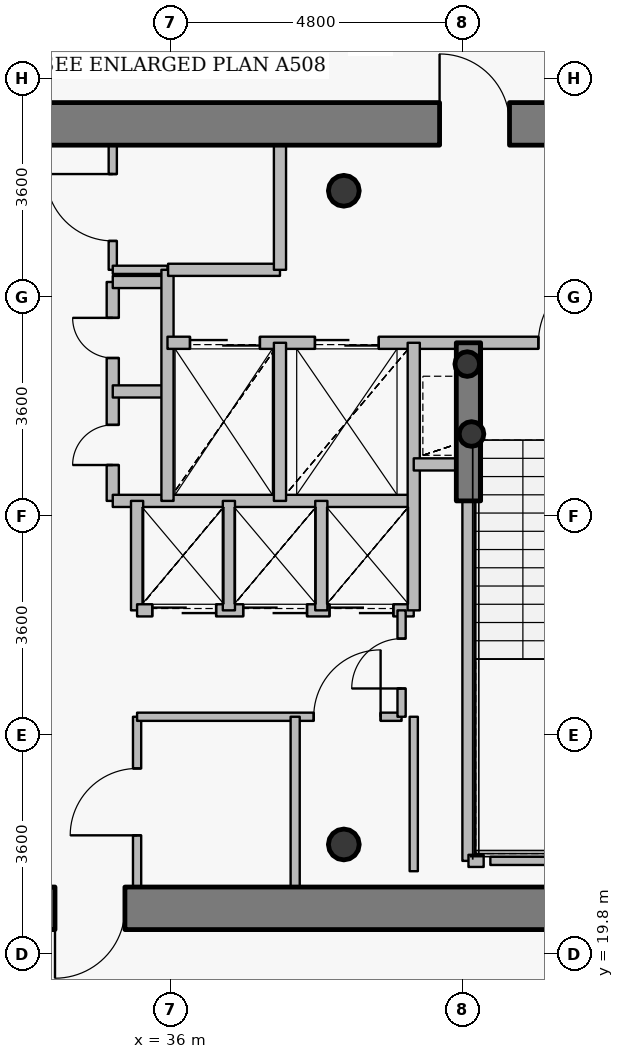
"""IFC4 building model, lengths in metres.
Left out: names, types, materials, properties, quantities, classifications, styles, units other than length and angle.
Written with IfcOpenShell. Run it as: python <this file> out.ifc"""

import sys

from ifc_helpers import new_model, si_unit, direction, frame, frame_2d, origin, origin_2d, place, context, subcontext, project, spatial, rectangle, hollow_circle, extrude, source, transform, mapped, element, fill, save


model = new_model("IFC4")
c1 = context("Model", 3, precision=1e-05, world=origin(), true_north=direction((0.0, 1.0)))
c2 = subcontext(c1, "Body", "Model", "MODEL_VIEW")
j1 = project(units=[si_unit("LENGTHUNIT", "METRE"), si_unit("PLANEANGLEUNIT", "RADIAN")], contexts=[c1])
p1 = place(None, origin())
s1 = spatial("IfcSite", under=j1, at=p1, CompositionType="ELEMENT")
p2 = place(p1, origin())
s2 = spatial("IfcBuilding", under=s1, at=p2, CompositionType="ELEMENT")
p3 = place(p2, frame((0.0, 0.0, 295.5)))
s3 = spatial("IfcBuildingStorey", under=s2, at=p3, CompositionType="ELEMENT", Elevation=295.5)
for number, where, z_axis, x_axis in (
    (1, (38.85, 21.6, 0.0), (0.0, 0.0, 1.0), (1.0, 0.0, 0.0)),
    (2, (38.85, 32.35, 0.0), (0.0, 0.0, 1.0), (1.0, 0.0, 0.0)),
):
    element("IfcColumn", number, at=place(p3, frame(where, z_axis=z_axis, x_axis=x_axis)), inside=s3, PredefinedType="COLUMN", context=c2, shape_type="SweptSolid", body=[
        extrude(hollow_circle(Radius=0.254, WallThickness=0.02, at=origin_2d()), origin(), (0.0, 0.0, 1.0), 3.75),
    ])
for number, where, z_axis, x_axis in (
    (3, (40.95, 28.35, 0.0), (0.0, 0.0, 1.0), (1.0, 0.0, 0.0)),
    (4, (40.88, 29.5, 0.0), (0.0, 0.0, 1.0), (1.0, 0.0, 0.0)),
):
    element("IfcColumn", number, at=place(p3, frame(where, z_axis=z_axis, x_axis=x_axis)), inside=s3, PredefinedType="COLUMN", context=c2, shape_type="SweptSolid", body=[
        extrude(hollow_circle(Radius=0.203, WallThickness=0.016, at=origin_2d()), origin(), (0.0, 0.0, 1.0), 3.75),
    ])
p4 = place(p3, frame((27.65, 33.45, 0.0), z_axis=(0.0, 0.0, 1.0), x_axis=(1.0, 0.0, 0.0)))
e5 = element("IfcWall", 5, at=p4, inside=s3, PredefinedType="SHEAR", context=c2, shape_type="SweptSolid", body=[
    extrude(rectangle(XDim=16.7, YDim=0.7, at=frame_2d((8.35, 0.0))), origin(), (0.0, 0.0, 1.0), 3.05),
])
p5 = place(p4, frame((12.775, 0.0, 0.0)))
e6 = element("IfcOpeningElement", 6, at=p5, cuts=e5, PredefinedType="OPENING", context=c2, shape_type="SweptSolid", body=[
    extrude(rectangle(XDim=1.15, YDim=2.15, at=origin_2d()), frame((0.575, 0.36, 1.075), z_axis=(0.0, -1.0, 0.0), x_axis=(1.0, 0.0, 0.0)), (0.0, 0.0, 1.0), 0.72),
])
p6 = place(p3, frame((44.35, 20.55, 0.0), z_axis=(0.0, 0.0, 1.0), x_axis=(-1.0, 0.0, 0.0)))
e7 = element("IfcWall", 7, at=p6, inside=s3, PredefinedType="SHEAR", context=c2, shape_type="SweptSolid", body=[
    extrude(rectangle(XDim=16.7, YDim=0.7, at=frame_2d((8.35, 0.0))), origin(), (0.0, 0.0, 1.0), 3.05),
])
p7 = place(p6, frame((12.925, 0.0, 0.0)))
e8 = element("IfcOpeningElement", 8, at=p7, cuts=e7, PredefinedType="OPENING", context=c2, shape_type="SweptSolid", body=[
    extrude(rectangle(XDim=1.15, YDim=2.15, at=origin_2d()), frame((0.575, 0.36, 1.075), z_axis=(0.0, -1.0, 0.0), x_axis=(1.0, 0.0, 0.0)), (0.0, 0.0, 1.0), 0.72),
])
p8 = place(p6, frame((9.1, 0.0, 0.0)))
e9 = element("IfcOpeningElement", 9, at=p8, cuts=e7, PredefinedType="OPENING", context=c2, shape_type="SweptSolid", body=[
    extrude(rectangle(XDim=1.15, YDim=2.15, at=origin_2d()), frame((0.575, 0.36, 1.075), z_axis=(0.0, -1.0, 0.0), x_axis=(1.0, 0.0, 0.0)), (0.0, 0.0, 1.0), 0.72),
])
p9 = place(p3, frame((40.9, 27.25, 0.0), z_axis=(0.0, 0.0, 1.0), x_axis=(0.0, 1.0, 0.0)))
e10 = element("IfcWall", 10, at=p9, inside=s3, PredefinedType="SHEAR", context=c2, shape_type="SweptSolid", body=[
    extrude(rectangle(XDim=2.6, YDim=0.4, at=frame_2d((1.3, 0.0))), origin(), (0.0, 0.0, 1.0), 3.1),
])
p10 = place(p3, frame((35.05, 27.25, 0.0), z_axis=(0.0, 0.0, 1.0), x_axis=(0.0, 1.0, 0.0)))
e11 = element("IfcWall", 11, at=p10, inside=s3, PredefinedType="PARTITIONING", context=c2, shape_type="SweptSolid", body=[
    extrude(rectangle(XDim=3.6, YDim=0.2, at=frame_2d((1.8, 0.0))), origin(), (0.0, 0.0, 1.0), 3.5),
])
p11 = place(p10, frame((0.59, 0.0, 0.0)))
e12 = element("IfcOpeningElement", 12, at=p11, cuts=e11, PredefinedType="OPENING", context=c2, shape_type="SweptSolid", body=[
    extrude(rectangle(XDim=0.66, YDim=2.05, at=origin_2d()), frame((0.33, 0.11, 1.025), z_axis=(0.0, -1.0, 0.0), x_axis=(1.0, 0.0, 0.0)), (0.0, 0.0, 1.0), 0.22),
])
p12 = place(p10, frame((2.35, 0.0, 0.0)))
e13 = element("IfcOpeningElement", 13, at=p12, cuts=e11, PredefinedType="OPENING", context=c2, shape_type="SweptSolid", body=[
    extrude(rectangle(XDim=0.66, YDim=2.05, at=origin_2d()), frame((0.33, 0.11, 1.025), z_axis=(0.0, -1.0, 0.0), x_axis=(1.0, 0.0, 0.0)), (0.0, 0.0, 1.0), 0.22),
])
p13 = place(p3, frame((35.05, 27.25, 0.0), z_axis=(0.0, 0.0, 1.0), x_axis=(1.0, 0.0, 0.0)))
e14 = element("IfcWall", 14, at=p13, inside=s3, PredefinedType="PARTITIONING", context=c2, shape_type="SweptSolid", body=[
    extrude(rectangle(XDim=4.95, YDim=0.2, at=frame_2d((2.475, 0.0))), origin(), (0.0, 0.0, 1.0), 3.085),
])
for number, where, z_axis, x_axis in (
    (15, (35.05, 29.05, 0.0), (0.0, 0.0, 1.0), (1.0, 0.0, 0.0)),
    (16, (35.05, 30.85, 0.0), (0.0, 0.0, 1.0), (1.0, 0.0, 0.0)),
):
    element("IfcWall", number, at=place(p3, frame(where, z_axis=z_axis, x_axis=x_axis)), inside=s3, PredefinedType="PARTITIONING", context=c2, shape_type="SweptSolid", body=[
        extrude(rectangle(XDim=0.9, YDim=0.2, at=frame_2d((0.45, 0.0))), origin(), (0.0, 0.0, 1.0), 3.5),
    ])
p14 = place(p3, frame((35.05, 31.05, 0.0), z_axis=(0.0, 0.0, 1.0), x_axis=(0.0, 1.0, 0.0)))
e17 = element("IfcWall", 17, at=p14, inside=s3, PredefinedType="PARTITIONING", context=c2, shape_type="SweptSolid", body=[
    extrude(rectangle(XDim=2.05, YDim=0.135, at=frame_2d((1.025, 0.0))), origin(), (0.0, 0.0, 1.0), 3.085),
])
p15 = place(p14, frame((0.475, 0.0, 0.0)))
e18 = element("IfcOpeningElement", 18, at=p15, cuts=e17, PredefinedType="OPENING", context=c2, shape_type="SweptSolid", body=[
    extrude(rectangle(XDim=1.1, YDim=2.15, at=origin_2d()), frame((0.55, 0.078, 1.075), z_axis=(0.0, -1.0, 0.0), x_axis=(1.0, 0.0, 0.0)), (0.0, 0.0, 1.0), 0.155),
])
p16 = place(p3, frame((35.05, 31.05, 0.0), z_axis=(0.0, 0.0, 1.0), x_axis=(1.0, 0.0, 0.0)))
e19 = element("IfcWall", 19, at=p16, inside=s3, PredefinedType="PARTITIONING", context=c2, shape_type="SweptSolid", body=[
    extrude(rectangle(XDim=0.9, YDim=0.135, at=frame_2d((0.45, 0.0))), origin(), (0.0, 0.0, 1.0), 3.5),
])
p17 = place(p3, frame((35.45, 20.9, 0.0), z_axis=(0.0, 0.0, 1.0), x_axis=(0.0, 1.0, 0.0)))
e20 = element("IfcWall", 20, at=p17, inside=s3, PredefinedType="PARTITIONING", context=c2, shape_type="SweptSolid", body=[
    extrude(rectangle(XDim=2.8, YDim=0.135, at=frame_2d((1.4, 0.0))), origin(), (0.0, 0.0, 1.0), 3.085),
])
p18 = place(p17, frame((0.85, 0.0, 0.0)))
e21 = element("IfcOpeningElement", 21, at=p18, cuts=e20, PredefinedType="OPENING", context=c2, shape_type="SweptSolid", body=[
    extrude(rectangle(XDim=1.1, YDim=2.15, at=origin_2d()), frame((0.55, 0.078, 1.075), z_axis=(0.0, -1.0, 0.0), x_axis=(1.0, 0.0, 0.0)), (0.0, 0.0, 1.0), 0.155),
])
p19 = place(p3, frame((35.45, 23.7, 0.0), z_axis=(0.0, 0.0, 1.0), x_axis=(1.0, 0.0, 0.0)))
e22 = element("IfcWall", 22, at=p19, inside=s3, PredefinedType="PARTITIONING", context=c2, shape_type="SweptSolid", body=[
    extrude(rectangle(XDim=4.35, YDim=0.135, at=frame_2d((2.175, 0.0))), origin(), (0.0, 0.0, 1.0), 3.085),
])
p20 = place(p19, frame((2.905, 0.0, 0.0)))
e23 = element("IfcOpeningElement", 23, at=p20, cuts=e22, PredefinedType="OPENING", context=c2, shape_type="SweptSolid", body=[
    extrude(rectangle(XDim=1.1, YDim=2.15, at=origin_2d()), frame((0.55, 0.078, 1.075), z_axis=(0.0, -1.0, 0.0), x_axis=(1.0, 0.0, 0.0)), (0.0, 0.0, 1.0), 0.155),
])
p21 = place(p3, frame((35.45, 25.45, 0.0), z_axis=(0.0, 0.0, 1.0), x_axis=(0.0, 1.0, 0.0)))
e24 = element("IfcWall", 24, at=p21, inside=s3, PredefinedType="PARTITIONING", context=c2, shape_type="SweptSolid", body=[
    extrude(rectangle(XDim=1.8, YDim=0.2, at=frame_2d((0.9, 0.0))), origin(), (0.0, 0.0, 1.0), 3.5),
])
p22 = place(p3, frame((35.45, 25.45, 0.0), z_axis=(0.0, 0.0, 1.0), x_axis=(1.0, 0.0, 0.0)))
e25 = element("IfcWall", 25, at=p22, inside=s3, PredefinedType="PARTITIONING", context=c2, shape_type="SweptSolid", body=[
    extrude(rectangle(XDim=4.55, YDim=0.2, at=frame_2d((2.275, 0.0))), origin(), (0.0, 0.0, 1.0), 3.085),
])
p23 = place(p22, frame((0.25, 0.0, 0.0)))
e26 = element("IfcOpeningElement", 26, at=p23, cuts=e25, PredefinedType="OPENING", context=c2, shape_type="SweptSolid", body=[
    extrude(rectangle(XDim=1.05, YDim=2.15, at=origin_2d()), frame((0.525, 0.11, 1.075), z_axis=(0.0, -1.0, 0.0), x_axis=(1.0, 0.0, 0.0)), (0.0, 0.0, 1.0), 0.22),
])
p24 = place(p22, frame((1.745, 0.0, 0.0)))
e27 = element("IfcOpeningElement", 27, at=p24, cuts=e25, PredefinedType="OPENING", context=c2, shape_type="SweptSolid", body=[
    extrude(rectangle(XDim=1.05, YDim=2.15, at=origin_2d()), frame((0.525, 0.11, 1.075), z_axis=(0.0, -1.0, 0.0), x_axis=(1.0, 0.0, 0.0)), (0.0, 0.0, 1.0), 0.22),
])
p25 = place(p22, frame((3.165, 0.0, 0.0)))
e28 = element("IfcOpeningElement", 28, at=p25, cuts=e25, PredefinedType="OPENING", context=c2, shape_type="SweptSolid", body=[
    extrude(rectangle(XDim=1.05, YDim=2.15, at=origin_2d()), frame((0.525, 0.11, 1.075), z_axis=(0.0, -1.0, 0.0), x_axis=(1.0, 0.0, 0.0)), (0.0, 0.0, 1.0), 0.22),
])
p26 = place(p3, frame((35.95, 27.25, 0.0), z_axis=(0.0, 0.0, 1.0), x_axis=(0.0, 1.0, 0.0)))
e29 = element("IfcWall", 29, at=p26, inside=s3, PredefinedType="PARTITIONING", context=c2, shape_type="SweptSolid", body=[
    extrude(rectangle(XDim=3.8, YDim=0.2, at=frame_2d((1.9, 0.0))), origin(), (0.0, 0.0, 1.0), 3.5),
])
p27 = place(p3, frame((35.95, 29.85, 0.0), z_axis=(0.0, 0.0, 1.0), x_axis=(1.0, 0.0, 0.0)))
e30 = element("IfcWall", 30, at=p27, inside=s3, PredefinedType="PARTITIONING", context=c2, shape_type="SweptSolid", body=[
    extrude(rectangle(XDim=8.49, YDim=0.2, at=frame_2d((4.245, 0.0))), origin(), (0.0, 0.0, 1.0), 3.085),
])
p28 = place(p27, frame((6.1, 0.0, 0.0)))
e31 = element("IfcOpeningElement", 31, at=p28, cuts=e30, PredefinedType="OPENING", context=c2, shape_type="SweptSolid", body=[
    extrude(rectangle(XDim=1.2, YDim=2.15, at=origin_2d()), frame((0.6, 0.11, 1.075), z_axis=(0.0, -1.0, 0.0), x_axis=(1.0, 0.0, 0.0)), (0.0, 0.0, 1.0), 0.22),
])
p29 = place(p27, frame((0.37, 0.0, 0.0)))
e32 = element("IfcOpeningElement", 32, at=p29, cuts=e30, PredefinedType="OPENING", context=c2, shape_type="SweptSolid", body=[
    extrude(rectangle(XDim=1.15, YDim=2.15, at=origin_2d()), frame((0.575, 0.11, 1.075), z_axis=(0.0, -1.0, 0.0), x_axis=(1.0, 0.0, 0.0)), (0.0, 0.0, 1.0), 0.22),
])
p30 = place(p27, frame((2.425, 0.0, 0.0)))
e33 = element("IfcOpeningElement", 33, at=p30, cuts=e30, PredefinedType="OPENING", context=c2, shape_type="SweptSolid", body=[
    extrude(rectangle(XDim=1.05, YDim=2.15, at=origin_2d()), frame((0.525, 0.11, 1.075), z_axis=(0.0, -1.0, 0.0), x_axis=(1.0, 0.0, 0.0)), (0.0, 0.0, 1.0), 0.22),
])
p31 = place(p3, frame((35.96, 31.05, 0.0), z_axis=(0.0, 0.0, 1.0), x_axis=(1.0, 0.0, 0.0)))
e34 = element("IfcWall", 34, at=p31, inside=s3, PredefinedType="PARTITIONING", context=c2, shape_type="SweptSolid", body=[
    extrude(rectangle(XDim=1.84, YDim=0.2, at=frame_2d((0.92, 0.0))), origin(), (0.0, 0.0, 1.0), 3.5),
])
p32 = place(p3, frame((36.96, 25.45, 0.0), z_axis=(0.0, 0.0, 1.0), x_axis=(0.0, 1.0, 0.0)))
e35 = element("IfcWall", 35, at=p32, inside=s3, PredefinedType="PARTITIONING", context=c2, shape_type="SweptSolid", body=[
    extrude(rectangle(XDim=1.8, YDim=0.2, at=frame_2d((0.9, 0.0))), origin(), (0.0, 0.0, 1.0), 3.5),
])
p33 = place(p3, frame((37.8, 27.25, 0.0), z_axis=(0.0, 0.0, 1.0), x_axis=(0.0, 1.0, 0.0)))
e36 = element("IfcWall", 36, at=p33, inside=s3, PredefinedType="PARTITIONING", context=c2, shape_type="SweptSolid", body=[
    extrude(rectangle(XDim=2.6, YDim=0.2, at=frame_2d((1.3, 0.0))), origin(), (0.0, 0.0, 1.0), 3.5),
])
p34 = place(p3, frame((37.8, 31.05, 0.0), z_axis=(0.0, 0.0, 1.0), x_axis=(0.0, 1.0, 0.0)))
e37 = element("IfcWall", 37, at=p34, inside=s3, PredefinedType="PARTITIONING", context=c2, shape_type="SweptSolid", body=[
    extrude(rectangle(XDim=2.05, YDim=0.2, at=frame_2d((1.025, 0.0))), origin(), (0.0, 0.0, 1.0), 3.085),
])
p35 = place(p3, frame((38.05, 20.38, 0.0), z_axis=(0.0, 0.0, 1.0), x_axis=(0.0, 1.0, 0.0)))
e38 = element("IfcWall", 38, at=p35, inside=s3, PredefinedType="PARTITIONING", context=c2, shape_type="SweptSolid", body=[
    extrude(rectangle(XDim=3.32, YDim=0.15, at=frame_2d((1.66, 0.0))), origin(), (0.0, 0.0, 1.0), 3.035),
])
p36 = place(p3, frame((38.48, 25.45, 0.0), z_axis=(0.0, 0.0, 1.0), x_axis=(0.0, 1.0, 0.0)))
e39 = element("IfcWall", 39, at=p36, inside=s3, PredefinedType="PARTITIONING", context=c2, shape_type="SweptSolid", body=[
    extrude(rectangle(XDim=1.8, YDim=0.2, at=frame_2d((0.9, 0.0))), origin(), (0.0, 0.0, 1.0), 3.5),
])
p37 = place(p3, frame((39.8, 23.7, 0.0), z_axis=(0.0, 0.0, 1.0), x_axis=(0.0, 1.0, 0.0)))
e40 = element("IfcWall", 40, at=p37, inside=s3, PredefinedType="PARTITIONING", context=c2, shape_type="SweptSolid", body=[
    extrude(rectangle(XDim=1.75, YDim=0.135, at=frame_2d((0.875, 0.0))), origin(), (0.0, 0.0, 1.0), 3.5),
])
p38 = place(p37, frame((0.465, 0.0, 0.0)))
e41 = element("IfcOpeningElement", 41, at=p38, cuts=e40, PredefinedType="OPENING", context=c2, shape_type="SweptSolid", body=[
    extrude(rectangle(XDim=0.82, YDim=2.1, at=origin_2d()), frame((0.41, 0.078, 1.05), z_axis=(0.0, -1.0, 0.0), x_axis=(1.0, 0.0, 0.0)), (0.0, 0.0, 1.0), 0.155),
])
p39 = place(p3, frame((40.0, 25.45, 0.0), z_axis=(0.0, 0.0, 1.0), x_axis=(0.0, 1.0, 0.0)))
e42 = element("IfcWall", 42, at=p39, inside=s3, PredefinedType="PARTITIONING", context=c2, shape_type="SweptSolid", body=[
    extrude(rectangle(XDim=4.4, YDim=0.2, at=frame_2d((2.2, 0.0))), origin(), (0.0, 0.0, 1.0), 3.5),
])
p40 = place(p3, frame((40.0, 27.85, 0.0), z_axis=(0.0, 0.0, 1.0), x_axis=(1.0, 0.0, 0.0)))
e43 = element("IfcWall", 43, at=p40, inside=s3, PredefinedType="PARTITIONING", context=c2, shape_type="SweptSolid", body=[
    extrude(rectangle(XDim=0.9, YDim=0.2, at=frame_2d((0.45, 0.0))), origin(), (0.0, 0.0, 1.0), 3.5),
])
p41 = place(p3, frame((40.9, 21.33, 0.0), z_axis=(0.0, 0.0, 1.0), x_axis=(0.0, 1.0, 0.0)))
e44 = element("IfcWall", 44, at=p41, inside=s3, PredefinedType="PARTITIONING", context=c2, shape_type="SweptSolid", body=[
    extrude(rectangle(XDim=5.91, YDim=0.2, at=frame_2d((2.955, 0.0))), origin(), (0.0, 0.0, 1.0), 3.035),
])
p42 = place(p3, frame((40.9, 21.33, 0.0), z_axis=(0.0, 0.0, 1.0), x_axis=(1.0, 0.0, 0.0)))
e45 = element("IfcWall", 45, at=p42, inside=s3, PredefinedType="PARTITIONING", context=c2, shape_type="SweptSolid", body=[
    extrude(rectangle(XDim=0.25, YDim=0.2, at=frame_2d((0.125, 0.0))), origin(), (0.0, 0.0, 1.0), 3.035),
])
p43 = place(p3, frame((44.24, 21.33, 0.0), z_axis=(0.0, 0.0, 1.0), x_axis=(-1.0, 0.0, 0.0)))
e46 = element("IfcWall", 46, at=p43, inside=s3, PredefinedType="PARTITIONING", context=c2, shape_type="SweptSolid", body=[
    extrude(rectangle(XDim=2.98, YDim=0.135, at=frame_2d((1.49, 0.0))), origin(), (0.0, 0.0, 1.0), 3.035),
])
p44 = place(p3, frame((40.0, 23.7, 0.0), z_axis=(0.0, 0.0, 1.0), x_axis=(0.0, -1.0, 0.0)))
e47 = element("IfcWall", 47, at=p44, inside=s3, PredefinedType="PARTITIONING", context=c2, shape_type="SweptSolid", body=[
    extrude(rectangle(XDim=2.54, YDim=0.135, at=frame_2d((1.27, 0.0))), origin(), (0.0, 0.0, 1.0), 3.035),
])
m1 = source(origin(), c2, "Body", "SweptSolid", [
    extrude(rectangle(XDim=1.15, YDim=2.15, at=origin_2d()), frame((0.575, 0.025, 1.075), z_axis=(0.0, -1.0, 0.0), x_axis=(1.0, 0.0, 0.0)), (0.0, 0.0, 1.0), 0.05),
])
p45 = place(p5, origin())
e48 = element("IfcDoor", 48, at=p45, inside=s3, OperationType="SINGLE_SWING_LEFT", PredefinedType="DOOR", context=c2, shape_type="MappedRepresentation", body=[
    mapped(m1, transform((0.0, 0.0, 0.0), x_axis=(1.0, 0.0, 0.0), y_axis=(0.0, 1.0, 0.0), z_axis=(0.0, 0.0, 1.0), scale=1.0)),
])
fill(e6, e48)
p46 = place(p8, origin())
e49 = element("IfcDoor", 49, at=p46, inside=s3, OperationType="SINGLE_SWING_RIGHT", PredefinedType="DOOR", context=c2, shape_type="MappedRepresentation", body=[
    mapped(m1, transform((0.0, 0.0, 0.0), x_axis=(1.0, 0.0, 0.0), y_axis=(0.0, 1.0, 0.0), z_axis=(0.0, 0.0, 1.0), scale=1.0)),
])
fill(e9, e49)
m2 = source(origin(), c2, "Body", "SweptSolid", [
    extrude(rectangle(XDim=1.2, YDim=2.15, at=origin_2d()), frame((0.6, 0.025, 1.075), z_axis=(0.0, -1.0, 0.0), x_axis=(1.0, 0.0, 0.0)), (0.0, 0.0, 1.0), 0.05),
])
p47 = place(p28, origin())
e50 = element("IfcDoor", 50, at=p47, inside=s3, OperationType="SINGLE_SWING_RIGHT", PredefinedType="DOOR", context=c2, shape_type="MappedRepresentation", body=[
    mapped(m2, transform((0.0, 0.0, 0.0), x_axis=(1.0, 0.0, 0.0), y_axis=(0.0, 1.0, 0.0), z_axis=(0.0, 0.0, 1.0), scale=1.0)),
])
fill(e31, e50)
m3 = source(origin(), c2, "Body", "SweptSolid", [
    extrude(rectangle(XDim=1.15, YDim=2.15, at=origin_2d()), frame((0.575, 0.025, 1.075), z_axis=(0.0, -1.0, 0.0), x_axis=(1.0, 0.0, 0.0)), (0.0, 0.0, 1.0), 0.05),
])
p48 = place(p29, origin())
e51 = element("IfcDoor", 51, at=p48, inside=s3, OperationType="DOUBLE_DOOR_SLIDING", PredefinedType="USERDEFINED", context=c2, shape_type="MappedRepresentation", body=[
    mapped(m3, transform((0.0, 0.0, 0.0), x_axis=(1.0, 0.0, 0.0), y_axis=(0.0, 1.0, 0.0), z_axis=(0.0, 0.0, 1.0), scale=1.0)),
])
fill(e32, e51)
m4 = source(origin(), c2, "Body", "SweptSolid", [
    extrude(rectangle(XDim=1.05, YDim=2.15, at=origin_2d()), frame((0.525, 0.025, 1.075), z_axis=(0.0, -1.0, 0.0), x_axis=(1.0, 0.0, 0.0)), (0.0, 0.0, 1.0), 0.05),
])
p49 = place(p30, origin())
e52 = element("IfcDoor", 52, at=p49, inside=s3, OperationType="DOUBLE_DOOR_SLIDING", PredefinedType="USERDEFINED", context=c2, shape_type="MappedRepresentation", body=[
    mapped(m4, transform((0.0, 0.0, 0.0), x_axis=(1.0, 0.0, 0.0), y_axis=(0.0, 1.0, 0.0), z_axis=(0.0, 0.0, 1.0), scale=1.0)),
])
fill(e33, e52)
p50 = place(p23, origin())
e53 = element("IfcDoor", 53, at=p50, inside=s3, OperationType="DOUBLE_DOOR_SLIDING", PredefinedType="USERDEFINED", context=c2, shape_type="MappedRepresentation", body=[
    mapped(m4, transform((0.0, 0.0, 0.0), x_axis=(1.0, 0.0, 0.0), y_axis=(0.0, 1.0, 0.0), z_axis=(0.0, 0.0, 1.0), scale=1.0)),
])
fill(e26, e53)
p51 = place(p24, origin())
e54 = element("IfcDoor", 54, at=p51, inside=s3, OperationType="DOUBLE_DOOR_SLIDING", PredefinedType="USERDEFINED", context=c2, shape_type="MappedRepresentation", body=[
    mapped(m4, transform((0.0, 0.0, 0.0), x_axis=(1.0, 0.0, 0.0), y_axis=(0.0, 1.0, 0.0), z_axis=(0.0, 0.0, 1.0), scale=1.0)),
])
fill(e27, e54)
p52 = place(p25, origin())
e55 = element("IfcDoor", 55, at=p52, inside=s3, OperationType="DOUBLE_DOOR_SLIDING", PredefinedType="USERDEFINED", context=c2, shape_type="MappedRepresentation", body=[
    mapped(m4, transform((0.0, 0.0, 0.0), x_axis=(1.0, 0.0, 0.0), y_axis=(0.0, 1.0, 0.0), z_axis=(0.0, 0.0, 1.0), scale=1.0)),
])
fill(e28, e55)
m5 = source(origin(), c2, "Body", "SweptSolid", [
    extrude(rectangle(XDim=0.66, YDim=2.05, at=origin_2d()), frame((0.33, 0.025, 1.025), z_axis=(0.0, -1.0, 0.0), x_axis=(1.0, 0.0, 0.0)), (0.0, 0.0, 1.0), 0.05),
])
p53 = place(p11, origin())
e56 = element("IfcDoor", 56, at=p53, inside=s3, OperationType="SINGLE_SWING_LEFT", PredefinedType="USERDEFINED", context=c2, shape_type="MappedRepresentation", body=[
    mapped(m5, transform((0.0, 0.0, 0.0), x_axis=(1.0, 0.0, 0.0), y_axis=(0.0, 1.0, 0.0), z_axis=(0.0, 0.0, 1.0), scale=1.0)),
])
fill(e12, e56)
p54 = place(p12, origin())
e57 = element("IfcDoor", 57, at=p54, inside=s3, OperationType="SINGLE_SWING_RIGHT", PredefinedType="USERDEFINED", context=c2, shape_type="MappedRepresentation", body=[
    mapped(m5, transform((0.0, 0.0, 0.0), x_axis=(1.0, 0.0, 0.0), y_axis=(0.0, 1.0, 0.0), z_axis=(0.0, 0.0, 1.0), scale=1.0)),
])
fill(e13, e57)
m6 = source(origin(), c2, "Body", "SweptSolid", [
    extrude(rectangle(XDim=1.1, YDim=2.15, at=origin_2d()), frame((0.55, 0.025, 1.075), z_axis=(0.0, -1.0, 0.0), x_axis=(1.0, 0.0, 0.0)), (0.0, 0.0, 1.0), 0.05),
])
p55 = place(p18, origin())
e58 = element("IfcDoor", 58, at=p55, inside=s3, OperationType="SINGLE_SWING_LEFT", PredefinedType="DOOR", context=c2, shape_type="MappedRepresentation", body=[
    mapped(m6, transform((0.0, 0.0, 0.0), x_axis=(1.0, 0.0, 0.0), y_axis=(0.0, 1.0, 0.0), z_axis=(0.0, 0.0, 1.0), scale=1.0)),
])
fill(e21, e58)
p56 = place(p20, origin())
e59 = element("IfcDoor", 59, at=p56, inside=s3, OperationType="SINGLE_SWING_RIGHT", PredefinedType="DOOR", context=c2, shape_type="MappedRepresentation", body=[
    mapped(m6, transform((0.0, 0.0, 0.0), x_axis=(1.0, 0.0, 0.0), y_axis=(0.0, 1.0, 0.0), z_axis=(0.0, 0.0, 1.0), scale=1.0)),
])
fill(e23, e59)
p57 = place(p15, origin())
e60 = element("IfcDoor", 60, at=p57, inside=s3, OperationType="SINGLE_SWING_RIGHT", PredefinedType="DOOR", context=c2, shape_type="MappedRepresentation", body=[
    mapped(m6, transform((0.0, 0.0, 0.0), x_axis=(1.0, 0.0, 0.0), y_axis=(0.0, 1.0, 0.0), z_axis=(0.0, 0.0, 1.0), scale=1.0)),
])
fill(e18, e60)
m7 = source(origin(), c2, "Body", "SweptSolid", [
    extrude(rectangle(XDim=0.82, YDim=2.1, at=origin_2d()), frame((0.41, 0.025, 1.05), z_axis=(0.0, -1.0, 0.0), x_axis=(1.0, 0.0, 0.0)), (0.0, 0.0, 1.0), 0.05),
])
p58 = place(p38, origin())
e61 = element("IfcDoor", 61, at=p58, inside=s3, OperationType="SINGLE_SWING_LEFT", PredefinedType="DOOR", context=c2, shape_type="MappedRepresentation", body=[
    mapped(m7, transform((0.0, 0.0, 0.0), x_axis=(1.0, 0.0, 0.0), y_axis=(0.0, 1.0, 0.0), z_axis=(0.0, 0.0, 1.0), scale=1.0)),
])
fill(e41, e61)
save(model, sys.argv[1])
